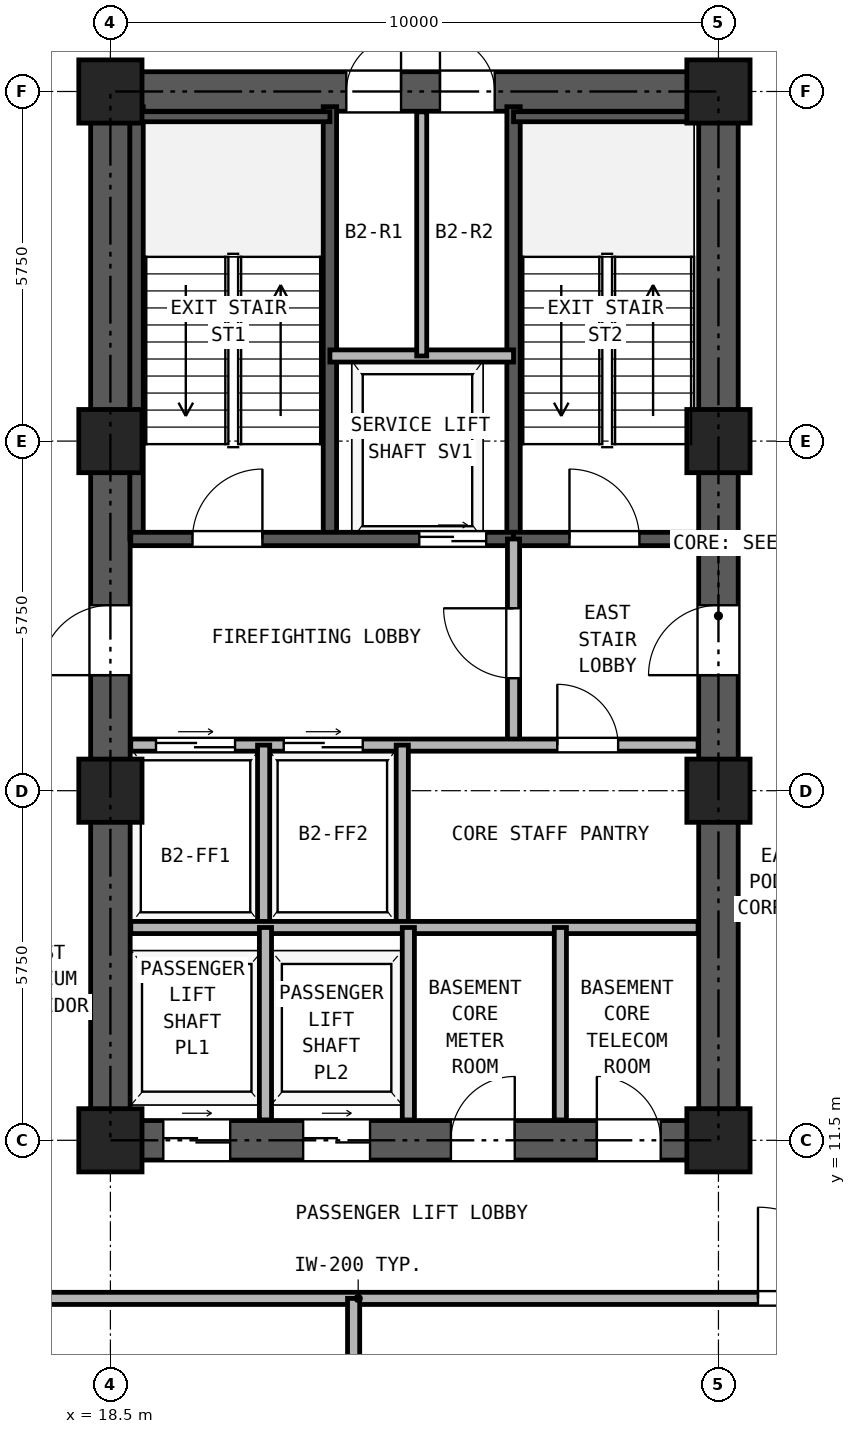
"""IFC4 building model, lengths in metres.
Left out: names, types, materials, properties, quantities, classifications, styles, units other than length and angle.
Written with IfcOpenShell. Run it as: python <this file> out.ifc"""

import sys

from ifc_helpers import new_model, si_unit, direction, frame, frame_2d, origin, origin_2d, place, context, subcontext, project, spatial, rectangle, hollow_rectangle, extrude, source, transform, mapped, element, fill, save


model = new_model("IFC4")
c1 = context("Model", 3, precision=1e-05, world=origin(), true_north=direction((0.0, 1.0)))
c2 = subcontext(c1, "Body", "Model", "MODEL_VIEW")
j1 = project(units=[si_unit("LENGTHUNIT", "METRE"), si_unit("PLANEANGLEUNIT", "RADIAN")], contexts=[c1])
p1 = place(None, origin())
s1 = spatial("IfcSite", under=j1, at=p1, CompositionType="ELEMENT")
p2 = place(p1, origin())
s2 = spatial("IfcBuilding", under=s1, at=p2, CompositionType="ELEMENT")
p3 = place(p2, frame((0.0, 0.0, -8.4)))
s3 = spatial("IfcBuildingStorey", under=s2, at=p3, CompositionType="ELEMENT", Elevation=-8.4)
m1 = source(origin(), c2, "Body", "SweptSolid", [
    extrude(hollow_rectangle(XDim=1.04, YDim=1.04, WallThickness=0.065, at=origin_2d()), origin(), (0.0, 0.0, 1.0), 3.88),
])
for number, where, z_axis, x_axis in (
    (1, (18.5, 11.5, 0.0), (0.0, 0.0, 1.0), (1.0, 0.0, 0.0)),
    (2, (18.5, 17.25, 0.0), (0.0, 0.0, 1.0), (1.0, 0.0, 0.0)),
    (3, (18.5, 23.0, 0.0), (0.0, 0.0, 1.0), (1.0, 0.0, 0.0)),
    (4, (18.5, 28.75, 0.0), (0.0, 0.0, 1.0), (1.0, 0.0, 0.0)),
    (5, (28.5, 11.5, 0.0), (0.0, 0.0, 1.0), (1.0, 0.0, 0.0)),
    (6, (28.5, 17.25, 0.0), (0.0, 0.0, 1.0), (1.0, 0.0, 0.0)),
    (7, (28.5, 23.0, 0.0), (0.0, 0.0, 1.0), (1.0, 0.0, 0.0)),
    (8, (28.5, 28.75, 0.0), (0.0, 0.0, 1.0), (1.0, 0.0, 0.0)),
):
    element("IfcColumn", number, at=place(p3, frame(where, z_axis=z_axis, x_axis=x_axis)), inside=s3, PredefinedType="COLUMN", context=c2, shape_type="MappedRepresentation", body=[
        mapped(m1, transform((0.0, 0.0, 0.0), x_axis=(1.0, 0.0, 0.0), y_axis=(0.0, 1.0, 0.0), z_axis=(0.0, 0.0, 1.0), scale=1.0)),
    ])
p4 = place(p3, frame((18.175, 11.5, 0.0), z_axis=(0.0, 0.0, 1.0), x_axis=(1.0, 0.0, 0.0)))
e9 = element("IfcWall", 9, at=p4, inside=s3, PredefinedType="SHEAR", context=c2, shape_type="SweptSolid", body=[
    extrude(rectangle(XDim=10.65, YDim=0.65, at=frame_2d((5.325, 0.0))), origin(), (0.0, 0.0, 1.0), 3.88),
])
p5 = place(p4, frame((1.195, 0.0, 0.0)))
e10 = element("IfcOpeningElement", 10, at=p5, cuts=e9, PredefinedType="OPENING", context=c2, shape_type="SweptSolid", body=[
    extrude(rectangle(XDim=1.1, YDim=2.25, at=frame_2d((0.55, 1.125))), frame((0.0, 0.335, 0.0), z_axis=(0.0, -1.0, 0.0), x_axis=(1.0, 0.0, 0.0)), (0.0, 0.0, 1.0), 0.67),
])
p6 = place(p4, frame((3.495, 0.0, 0.0)))
e11 = element("IfcOpeningElement", 11, at=p6, cuts=e9, PredefinedType="OPENING", context=c2, shape_type="SweptSolid", body=[
    extrude(rectangle(XDim=1.1, YDim=2.25, at=frame_2d((0.55, 1.125))), frame((0.0, 0.335, 0.0), z_axis=(0.0, -1.0, 0.0), x_axis=(1.0, 0.0, 0.0)), (0.0, 0.0, 1.0), 0.67),
])
p7 = place(p4, frame((5.925, 0.0, 0.0)))
e12 = element("IfcOpeningElement", 12, at=p7, cuts=e9, PredefinedType="OPENING", context=c2, shape_type="SweptSolid", body=[
    extrude(rectangle(XDim=1.05, YDim=2.15, at=frame_2d((0.525, 1.075))), frame((0.0, 0.335, 0.0), z_axis=(0.0, -1.0, 0.0), x_axis=(1.0, 0.0, 0.0)), (0.0, 0.0, 1.0), 0.67),
])
p8 = place(p4, frame((8.325, 0.0, 0.0)))
e13 = element("IfcOpeningElement", 13, at=p8, cuts=e9, PredefinedType="OPENING", context=c2, shape_type="SweptSolid", body=[
    extrude(rectangle(XDim=1.05, YDim=2.15, at=frame_2d((0.525, 1.075))), frame((0.0, 0.335, 0.0), z_axis=(0.0, -1.0, 0.0), x_axis=(1.0, 0.0, 0.0)), (0.0, 0.0, 1.0), 0.67),
])
p9 = place(p3, frame((18.175, 28.75, 0.0), z_axis=(0.0, 0.0, 1.0), x_axis=(1.0, 0.0, 0.0)))
e14 = element("IfcWall", 14, at=p9, inside=s3, PredefinedType="SHEAR", context=c2, shape_type="SweptSolid", body=[
    extrude(rectangle(XDim=10.65, YDim=0.65, at=frame_2d((5.325, 0.0))), origin(), (0.0, 0.0, 1.0), 3.88),
])
p10 = place(p9, frame((4.205, 0.0, 0.0)))
e15 = element("IfcOpeningElement", 15, at=p10, cuts=e14, PredefinedType="OPENING", context=c2, shape_type="SweptSolid", body=[
    extrude(rectangle(XDim=0.9, YDim=2.05, at=frame_2d((0.45, 1.025))), frame((0.0, 0.335, 0.0), z_axis=(0.0, -1.0, 0.0), x_axis=(1.0, 0.0, 0.0)), (0.0, 0.0, 1.0), 0.67),
])
p11 = place(p9, frame((5.745, 0.0, 0.0)))
e16 = element("IfcOpeningElement", 16, at=p11, cuts=e14, PredefinedType="OPENING", context=c2, shape_type="SweptSolid", body=[
    extrude(rectangle(XDim=0.9, YDim=2.05, at=frame_2d((0.45, 1.025))), frame((0.0, 0.335, 0.0), z_axis=(0.0, -1.0, 0.0), x_axis=(1.0, 0.0, 0.0)), (0.0, 0.0, 1.0), 0.67),
])
p12 = place(p3, frame((18.5, 11.825, 0.0), z_axis=(0.0, 0.0, 1.0), x_axis=(0.0, 1.0, 0.0)))
e17 = element("IfcWall", 17, at=p12, inside=s3, PredefinedType="SHEAR", context=c2, shape_type="SweptSolid", body=[
    extrude(rectangle(XDim=16.6, YDim=0.65, at=frame_2d((8.3, 0.0))), origin(), (0.0, 0.0, 1.0), 3.88),
])
p13 = place(p12, frame((7.325, 0.0, 0.0)))
e18 = element("IfcOpeningElement", 18, at=p13, cuts=e17, PredefinedType="OPENING", context=c2, shape_type="SweptSolid", body=[
    extrude(rectangle(XDim=1.15, YDim=2.2, at=frame_2d((0.575, 1.1))), frame((0.0, 0.335, 0.0), z_axis=(0.0, -1.0, 0.0), x_axis=(1.0, 0.0, 0.0)), (0.0, 0.0, 1.0), 0.67),
])
p14 = place(p3, frame((28.5, 11.825, 0.0), z_axis=(0.0, 0.0, 1.0), x_axis=(0.0, 1.0, 0.0)))
e19 = element("IfcWall", 19, at=p14, inside=s3, PredefinedType="SHEAR", context=c2, shape_type="SweptSolid", body=[
    extrude(rectangle(XDim=16.6, YDim=0.65, at=frame_2d((8.3, 0.0))), origin(), (0.0, 0.0, 1.0), 3.88),
])
p15 = place(p14, frame((7.325, 0.0, 0.0)))
e20 = element("IfcOpeningElement", 20, at=p15, cuts=e19, PredefinedType="OPENING", context=c2, shape_type="SweptSolid", body=[
    extrude(rectangle(XDim=1.15, YDim=2.2, at=frame_2d((0.575, 1.1))), frame((0.0, 0.335, 0.0), z_axis=(0.0, -1.0, 0.0), x_axis=(1.0, 0.0, 0.0)), (0.0, 0.0, 1.0), 0.67),
])
for number, where, z_axis, x_axis in (
    (21, (18.93, 21.39, 0.0), (0.0, 0.0, 1.0), (0.0, 1.0, 0.0)),
    (22, (22.11, 21.39, 0.0), (0.0, 0.0, 1.0), (0.0, 1.0, 0.0)),
    (23, (25.13, 21.39, 0.0), (0.0, 0.0, 1.0), (0.0, 1.0, 0.0)),
):
    element("IfcWall", number, at=place(p3, frame(where, z_axis=z_axis, x_axis=x_axis)), inside=s3, PredefinedType="SOLIDWALL", context=c2, shape_type="SweptSolid", body=[
        extrude(rectangle(XDim=7.11, YDim=0.22, at=frame_2d((3.555, 0.0))), origin(), (0.0, 0.0, 1.0), 3.88),
    ])
p16 = place(p3, frame((18.835, 28.335, 0.0), z_axis=(0.0, 0.0, 1.0), x_axis=(1.0, 0.0, 0.0)))
e24 = element("IfcWall", 24, at=p16, inside=s3, PredefinedType="PARTITIONING", context=c2, shape_type="SweptSolid", body=[
    extrude(rectangle(XDim=3.275, YDim=0.165, at=frame_2d((1.638, 0.0))), origin(), (0.0, 0.0, 1.0), 3.88),
])
p17 = place(p3, frame((25.13, 28.335, 0.0), z_axis=(0.0, 0.0, 1.0), x_axis=(1.0, 0.0, 0.0)))
e25 = element("IfcWall", 25, at=p17, inside=s3, PredefinedType="PARTITIONING", context=c2, shape_type="SweptSolid", body=[
    extrude(rectangle(XDim=3.035, YDim=0.165, at=frame_2d((1.518, 0.0))), origin(), (0.0, 0.0, 1.0), 3.88),
])
p18 = place(p3, frame((18.835, 21.39, 0.0), z_axis=(0.0, 0.0, 1.0), x_axis=(1.0, 0.0, 0.0)))
e26 = element("IfcWall", 26, at=p18, inside=s3, PredefinedType="SOLIDWALL", context=c2, shape_type="SweptSolid", body=[
    extrude(rectangle(XDim=6.295, YDim=0.22, at=frame_2d((3.147, 0.0))), origin(), (0.0, 0.0, 1.0), 3.88),
])
p19 = place(p18, frame((1.015, 0.0, 0.0)))
e27 = element("IfcOpeningElement", 27, at=p19, cuts=e26, PredefinedType="OPENING", context=c2, shape_type="SweptSolid", body=[
    extrude(rectangle(XDim=1.15, YDim=2.2, at=frame_2d((0.575, 1.1))), frame((0.0, 0.12, 0.0), z_axis=(0.0, -1.0, 0.0), x_axis=(1.0, 0.0, 0.0)), (0.0, 0.0, 1.0), 0.24),
])
p20 = place(p18, frame((4.745, 0.0, 0.0)))
e28 = element("IfcOpeningElement", 28, at=p20, cuts=e26, PredefinedType="OPENING", context=c2, shape_type="SweptSolid", body=[
    extrude(rectangle(XDim=1.1, YDim=2.25, at=frame_2d((0.55, 1.125))), frame((0.0, 0.12, 0.0), z_axis=(0.0, -1.0, 0.0), x_axis=(1.0, 0.0, 0.0)), (0.0, 0.0, 1.0), 0.24),
])
p21 = place(p3, frame((25.13, 21.39, 0.0), z_axis=(0.0, 0.0, 1.0), x_axis=(1.0, 0.0, 0.0)))
e29 = element("IfcWall", 29, at=p21, inside=s3, PredefinedType="SOLIDWALL", context=c2, shape_type="SweptSolid", body=[
    extrude(rectangle(XDim=3.035, YDim=0.22, at=frame_2d((1.518, 0.0))), origin(), (0.0, 0.0, 1.0), 3.88),
])
p22 = place(p21, frame((0.92, 0.0, 0.0)))
e30 = element("IfcOpeningElement", 30, at=p22, cuts=e29, PredefinedType="OPENING", context=c2, shape_type="SweptSolid", body=[
    extrude(rectangle(XDim=1.15, YDim=2.2, at=frame_2d((0.575, 1.1))), frame((0.0, 0.12, 0.0), z_axis=(0.0, -1.0, 0.0), x_axis=(1.0, 0.0, 0.0)), (0.0, 0.0, 1.0), 0.24),
])
p23 = place(p3, frame((22.11, 24.4, 0.0), z_axis=(0.0, 0.0, 1.0), x_axis=(1.0, 0.0, 0.0)))
e31 = element("IfcWall", 31, at=p23, inside=s3, PredefinedType="PARTITIONING", context=c2, shape_type="SweptSolid", body=[
    extrude(rectangle(XDim=3.02, YDim=0.2, at=frame_2d((1.51, 0.0))), origin(), (0.0, 0.0, 1.0), 3.88),
])
p24 = place(p3, frame((23.62, 24.4, 0.0), z_axis=(0.0, 0.0, 1.0), x_axis=(0.0, 1.0, 0.0)))
e32 = element("IfcWall", 32, at=p24, inside=s3, PredefinedType="PARTITIONING", context=c2, shape_type="SweptSolid", body=[
    extrude(rectangle(XDim=4.015, YDim=0.165, at=frame_2d((2.008, 0.0))), origin(), (0.0, 0.0, 1.0), 3.88),
])
p25 = place(p3, frame((25.13, 18.0, 0.0), z_axis=(0.0, 0.0, 1.0), x_axis=(0.0, 1.0, 0.0)))
e33 = element("IfcWall", 33, at=p25, inside=s3, PredefinedType="PARTITIONING", context=c2, shape_type="SweptSolid", body=[
    extrude(rectangle(XDim=3.39, YDim=0.2, at=frame_2d((1.695, 0.0))), origin(), (0.0, 0.0, 1.0), 3.88),
])
p26 = place(p25, frame((1.1, 0.0, 0.0)))
e34 = element("IfcOpeningElement", 34, at=p26, cuts=e33, PredefinedType="OPENING", context=c2, shape_type="SweptSolid", body=[
    extrude(rectangle(XDim=1.15, YDim=2.2, at=frame_2d((0.575, 1.1))), frame((0.0, 0.11, 0.0), z_axis=(0.0, -1.0, 0.0), x_axis=(1.0, 0.0, 0.0)), (0.0, 0.0, 1.0), 0.22),
])
p27 = place(p3, frame((18.835, 18.0, 0.0), z_axis=(0.0, 0.0, 1.0), x_axis=(1.0, 0.0, 0.0)))
e35 = element("IfcWall", 35, at=p27, inside=s3, PredefinedType="PARTITIONING", context=c2, shape_type="SweptSolid", body=[
    extrude(rectangle(XDim=9.33, YDim=0.2, at=frame_2d((4.665, 0.0))), origin(), (0.0, 0.0, 1.0), 3.88),
])
p28 = place(p27, frame((0.415, 0.0, 0.0)))
e36 = element("IfcOpeningElement", 36, at=p28, cuts=e35, PredefinedType="OPENING", context=c2, shape_type="SweptSolid", body=[
    extrude(rectangle(XDim=1.3, YDim=2.3, at=frame_2d((0.65, 1.15))), frame((0.0, 0.11, 0.0), z_axis=(0.0, -1.0, 0.0), x_axis=(1.0, 0.0, 0.0)), (0.0, 0.0, 1.0), 0.22),
])
p29 = place(p27, frame((2.515, 0.0, 0.0)))
e37 = element("IfcOpeningElement", 37, at=p29, cuts=e35, PredefinedType="OPENING", context=c2, shape_type="SweptSolid", body=[
    extrude(rectangle(XDim=1.3, YDim=2.3, at=frame_2d((0.65, 1.15))), frame((0.0, 0.11, 0.0), z_axis=(0.0, -1.0, 0.0), x_axis=(1.0, 0.0, 0.0)), (0.0, 0.0, 1.0), 0.22),
])
p30 = place(p27, frame((7.015, 0.0, 0.0)))
e38 = element("IfcOpeningElement", 38, at=p30, cuts=e35, PredefinedType="OPENING", context=c2, shape_type="SweptSolid", body=[
    extrude(rectangle(XDim=1.0, YDim=2.15, at=frame_2d((0.5, 1.075))), frame((0.0, 0.11, 0.0), z_axis=(0.0, -1.0, 0.0), x_axis=(1.0, 0.0, 0.0)), (0.0, 0.0, 1.0), 0.22),
])
for number, where, z_axis, x_axis in (
    (39, (21.02, 15.0, 0.0), (0.0, 0.0, 1.0), (0.0, 1.0, 0.0)),
    (40, (23.3, 15.0, 0.0), (0.0, 0.0, 1.0), (0.0, 1.0, 0.0)),
):
    element("IfcWall", number, at=place(p3, frame(where, z_axis=z_axis, x_axis=x_axis)), inside=s3, PredefinedType="PARTITIONING", context=c2, shape_type="SweptSolid", body=[
        extrude(rectangle(XDim=3.0, YDim=0.2, at=frame_2d((1.5, 0.0))), origin(), (0.0, 0.0, 1.0), 3.88),
    ])
p31 = place(p3, frame((18.835, 15.0, 0.0), z_axis=(0.0, 0.0, 1.0), x_axis=(1.0, 0.0, 0.0)))
e41 = element("IfcWall", 41, at=p31, inside=s3, PredefinedType="PARTITIONING", context=c2, shape_type="SweptSolid", body=[
    extrude(rectangle(XDim=9.33, YDim=0.2, at=frame_2d((4.665, 0.0))), origin(), (0.0, 0.0, 1.0), 3.88),
])
for number, where, z_axis, x_axis in (
    (42, (21.05, 11.835, 0.0), (0.0, 0.0, 1.0), (0.0, 1.0, 0.0)),
    (43, (23.4, 11.835, 0.0), (0.0, 0.0, 1.0), (0.0, 1.0, 0.0)),
    (44, (25.9, 11.835, 0.0), (0.0, 0.0, 1.0), (0.0, 1.0, 0.0)),
):
    element("IfcWall", number, at=place(p3, frame(where, z_axis=z_axis, x_axis=x_axis)), inside=s3, PredefinedType="PARTITIONING", context=c2, shape_type="SweptSolid", body=[
        extrude(rectangle(XDim=3.165, YDim=0.2, at=frame_2d((1.583, 0.0))), origin(), (0.0, 0.0, 1.0), 3.88),
    ])
p32 = place(p3, frame((7.5, 8.9, 0.0), z_axis=(0.0, 0.0, 1.0), x_axis=(1.0, 0.0, 0.0)))
e45 = element("IfcWall", 45, at=p32, inside=s3, PredefinedType="PARTITIONING", context=c2, shape_type="SweptSolid", body=[
    extrude(rectangle(XDim=32.0, YDim=0.2, at=frame_2d((16.0, 0.0))), origin(), (0.0, 0.0, 1.0), 3.88),
])
p33 = place(p32, frame((7.0, 0.0, 0.0)))
e46 = element("IfcOpeningElement", 46, at=p33, cuts=e45, PredefinedType="OPENING", context=c2, shape_type="SweptSolid", body=[
    extrude(rectangle(XDim=1.5, YDim=2.25, at=frame_2d((0.75, 1.125))), frame((0.0, 0.11, 0.0), z_axis=(0.0, -1.0, 0.0), x_axis=(1.0, 0.0, 0.0)), (0.0, 0.0, 1.0), 0.22),
])
p34 = place(p32, frame((21.65, 0.0, 0.0)))
e47 = element("IfcOpeningElement", 47, at=p34, cuts=e45, PredefinedType="OPENING", context=c2, shape_type="SweptSolid", body=[
    extrude(rectangle(XDim=1.5, YDim=2.25, at=frame_2d((0.75, 1.125))), frame((0.0, 0.11, 0.0), z_axis=(0.0, -1.0, 0.0), x_axis=(1.0, 0.0, 0.0)), (0.0, 0.0, 1.0), 0.22),
])
p35 = place(p32, frame((30.15, 0.0, 0.0)))
e48 = element("IfcOpeningElement", 48, at=p35, cuts=e45, PredefinedType="OPENING", context=c2, shape_type="SweptSolid", body=[
    extrude(rectangle(XDim=0.92, YDim=2.1, at=frame_2d((0.46, 1.05))), frame((0.0, 0.11, 0.0), z_axis=(0.0, -1.0, 0.0), x_axis=(1.0, 0.0, 0.0)), (0.0, 0.0, 1.0), 0.22),
])
p36 = place(p3, frame((22.5, 0.25, 0.0), z_axis=(0.0, 0.0, 1.0), x_axis=(0.0, 1.0, 0.0)))
e49 = element("IfcWall", 49, at=p36, inside=s3, PredefinedType="PARTITIONING", context=c2, shape_type="SweptSolid", body=[
    extrude(rectangle(XDim=8.65, YDim=0.2, at=frame_2d((4.325, 0.0))), origin(), (0.0, 0.0, 1.0), 3.88),
])
p37 = place(p19, frame((1.15, 0.0, 0.0), z_axis=(0.0, 0.0, 1.0), x_axis=(-1.0, 0.0, 0.0)))
e50 = element("IfcDoor", 50, at=p37, inside=s3, OperationType="SINGLE_SWING_RIGHT", PredefinedType="DOOR", context=c2, shape_type="SweptSolid", body=[
    extrude(rectangle(XDim=1.15, YDim=2.2, at=frame_2d((0.575, 1.1))), frame((0.0, 0.025, 0.0), z_axis=(0.0, -1.0, 0.0), x_axis=(1.0, 0.0, 0.0)), (0.0, 0.0, 1.0), 0.05),
])
fill(e27, e50)
p38 = place(p22, frame((1.15, 0.0, 0.0), z_axis=(0.0, 0.0, 1.0), x_axis=(-1.0, 0.0, 0.0)))
e51 = element("IfcDoor", 51, at=p38, inside=s3, OperationType="SINGLE_SWING_LEFT", PredefinedType="DOOR", context=c2, shape_type="SweptSolid", body=[
    extrude(rectangle(XDim=1.15, YDim=2.2, at=frame_2d((0.575, 1.1))), frame((0.0, 0.025, 0.0), z_axis=(0.0, -1.0, 0.0), x_axis=(1.0, 0.0, 0.0)), (0.0, 0.0, 1.0), 0.05),
])
fill(e30, e51)
p39 = place(p20, frame((1.1, 0.0, 0.0), z_axis=(0.0, 0.0, 1.0), x_axis=(-1.0, 0.0, 0.0)))
e52 = element("IfcDoor", 52, at=p39, inside=s3, OperationType="DOUBLE_DOOR_SLIDING", PredefinedType="DOOR", context=c2, shape_type="SweptSolid", body=[
    extrude(rectangle(XDim=1.1, YDim=2.25, at=frame_2d((0.55, 1.125))), frame((0.0, 0.025, 0.0), z_axis=(0.0, -1.0, 0.0), x_axis=(1.0, 0.0, 0.0)), (0.0, 0.0, 1.0), 0.05),
])
fill(e28, e52)
p40 = place(p26, origin())
e53 = element("IfcDoor", 53, at=p40, inside=s3, OperationType="SINGLE_SWING_RIGHT", PredefinedType="DOOR", context=c2, shape_type="SweptSolid", body=[
    extrude(rectangle(XDim=1.15, YDim=2.2, at=frame_2d((0.575, 1.1))), frame((0.0, 0.025, 0.0), z_axis=(0.0, -1.0, 0.0), x_axis=(1.0, 0.0, 0.0)), (0.0, 0.0, 1.0), 0.05),
])
fill(e34, e53)
p41 = place(p28, origin())
e54 = element("IfcDoor", 54, at=p41, inside=s3, OperationType="DOUBLE_DOOR_SLIDING", PredefinedType="DOOR", context=c2, shape_type="SweptSolid", body=[
    extrude(rectangle(XDim=1.3, YDim=2.3, at=frame_2d((0.65, 1.15))), frame((0.0, 0.025, 0.0), z_axis=(0.0, -1.0, 0.0), x_axis=(1.0, 0.0, 0.0)), (0.0, 0.0, 1.0), 0.05),
])
fill(e36, e54)
p42 = place(p29, origin())
e55 = element("IfcDoor", 55, at=p42, inside=s3, OperationType="DOUBLE_DOOR_SLIDING", PredefinedType="DOOR", context=c2, shape_type="SweptSolid", body=[
    extrude(rectangle(XDim=1.3, YDim=2.3, at=frame_2d((0.65, 1.15))), frame((0.0, 0.025, 0.0), z_axis=(0.0, -1.0, 0.0), x_axis=(1.0, 0.0, 0.0)), (0.0, 0.0, 1.0), 0.05),
])
fill(e37, e55)
p43 = place(p30, frame((1.0, 0.0, 0.0), z_axis=(0.0, 0.0, 1.0), x_axis=(-1.0, 0.0, 0.0)))
e56 = element("IfcDoor", 56, at=p43, inside=s3, OperationType="SINGLE_SWING_LEFT", PredefinedType="DOOR", context=c2, shape_type="SweptSolid", body=[
    extrude(rectangle(XDim=1.0, YDim=2.15, at=frame_2d((0.5, 1.075))), frame((0.0, 0.025, 0.0), z_axis=(0.0, -1.0, 0.0), x_axis=(1.0, 0.0, 0.0)), (0.0, 0.0, 1.0), 0.05),
])
fill(e38, e56)
p44 = place(p13, frame((1.15, 0.0, 0.0), z_axis=(0.0, 0.0, 1.0), x_axis=(-1.0, 0.0, 0.0)))
e57 = element("IfcDoor", 57, at=p44, inside=s3, OperationType="SINGLE_SWING_LEFT", PredefinedType="DOOR", context=c2, shape_type="SweptSolid", body=[
    extrude(rectangle(XDim=1.15, YDim=2.2, at=frame_2d((0.575, 1.1))), frame((0.0, 0.025, 0.0), z_axis=(0.0, -1.0, 0.0), x_axis=(1.0, 0.0, 0.0)), (0.0, 0.0, 1.0), 0.05),
])
fill(e18, e57)
p45 = place(p15, origin())
e58 = element("IfcDoor", 58, at=p45, inside=s3, OperationType="SINGLE_SWING_LEFT", PredefinedType="DOOR", context=c2, shape_type="SweptSolid", body=[
    extrude(rectangle(XDim=1.15, YDim=2.2, at=frame_2d((0.575, 1.1))), frame((0.0, 0.025, 0.0), z_axis=(0.0, -1.0, 0.0), x_axis=(1.0, 0.0, 0.0)), (0.0, 0.0, 1.0), 0.05),
])
fill(e20, e58)
p46 = place(p10, origin())
e59 = element("IfcDoor", 59, at=p46, inside=s3, OperationType="SINGLE_SWING_RIGHT", PredefinedType="DOOR", context=c2, shape_type="SweptSolid", body=[
    extrude(rectangle(XDim=0.9, YDim=2.05, at=frame_2d((0.45, 1.025))), frame((0.0, 0.025, 0.0), z_axis=(0.0, -1.0, 0.0), x_axis=(1.0, 0.0, 0.0)), (0.0, 0.0, 1.0), 0.05),
])
fill(e15, e59)
p47 = place(p11, origin())
e60 = element("IfcDoor", 60, at=p47, inside=s3, OperationType="SINGLE_SWING_LEFT", PredefinedType="DOOR", context=c2, shape_type="SweptSolid", body=[
    extrude(rectangle(XDim=0.9, YDim=2.05, at=frame_2d((0.45, 1.025))), frame((0.0, 0.025, 0.0), z_axis=(0.0, -1.0, 0.0), x_axis=(1.0, 0.0, 0.0)), (0.0, 0.0, 1.0), 0.05),
])
fill(e16, e60)
p48 = place(p5, frame((1.1, 0.0, 0.0), z_axis=(0.0, 0.0, 1.0), x_axis=(-1.0, 0.0, 0.0)))
e61 = element("IfcDoor", 61, at=p48, inside=s3, OperationType="DOUBLE_DOOR_SLIDING", PredefinedType="DOOR", context=c2, shape_type="SweptSolid", body=[
    extrude(rectangle(XDim=1.1, YDim=2.25, at=frame_2d((0.55, 1.125))), frame((0.0, 0.025, 0.0), z_axis=(0.0, -1.0, 0.0), x_axis=(1.0, 0.0, 0.0)), (0.0, 0.0, 1.0), 0.05),
])
fill(e10, e61)
p49 = place(p6, frame((1.1, 0.0, 0.0), z_axis=(0.0, 0.0, 1.0), x_axis=(-1.0, 0.0, 0.0)))
e62 = element("IfcDoor", 62, at=p49, inside=s3, OperationType="DOUBLE_DOOR_SLIDING", PredefinedType="DOOR", context=c2, shape_type="SweptSolid", body=[
    extrude(rectangle(XDim=1.1, YDim=2.25, at=frame_2d((0.55, 1.125))), frame((0.0, 0.025, 0.0), z_axis=(0.0, -1.0, 0.0), x_axis=(1.0, 0.0, 0.0)), (0.0, 0.0, 1.0), 0.05),
])
fill(e11, e62)
p50 = place(p7, frame((1.05, 0.0, 0.0), z_axis=(0.0, 0.0, 1.0), x_axis=(-1.0, 0.0, 0.0)))
e63 = element("IfcDoor", 63, at=p50, inside=s3, OperationType="SINGLE_SWING_RIGHT", PredefinedType="DOOR", context=c2, shape_type="SweptSolid", body=[
    extrude(rectangle(XDim=1.05, YDim=2.15, at=frame_2d((0.525, 1.075))), frame((0.0, 0.025, 0.0), z_axis=(0.0, -1.0, 0.0), x_axis=(1.0, 0.0, 0.0)), (0.0, 0.0, 1.0), 0.05),
])
fill(e12, e63)
p51 = place(p8, frame((1.05, 0.0, 0.0), z_axis=(0.0, 0.0, 1.0), x_axis=(-1.0, 0.0, 0.0)))
e64 = element("IfcDoor", 64, at=p51, inside=s3, OperationType="SINGLE_SWING_LEFT", PredefinedType="DOOR", context=c2, shape_type="SweptSolid", body=[
    extrude(rectangle(XDim=1.05, YDim=2.15, at=frame_2d((0.525, 1.075))), frame((0.0, 0.025, 0.0), z_axis=(0.0, -1.0, 0.0), x_axis=(1.0, 0.0, 0.0)), (0.0, 0.0, 1.0), 0.05),
])
fill(e13, e64)
p52 = place(p34, frame((1.5, 0.0, 0.0), z_axis=(0.0, 0.0, 1.0), x_axis=(-1.0, 0.0, 0.0)))
e65 = element("IfcDoor", 65, at=p52, inside=s3, OperationType="SINGLE_SWING_LEFT", PredefinedType="DOOR", context=c2, shape_type="SweptSolid", body=[
    extrude(rectangle(XDim=1.5, YDim=2.25, at=frame_2d((0.75, 1.125))), frame((0.0, 0.025, 0.0), z_axis=(0.0, -1.0, 0.0), x_axis=(1.0, 0.0, 0.0)), (0.0, 0.0, 1.0), 0.05),
])
fill(e47, e65)
save(model, sys.argv[1])
